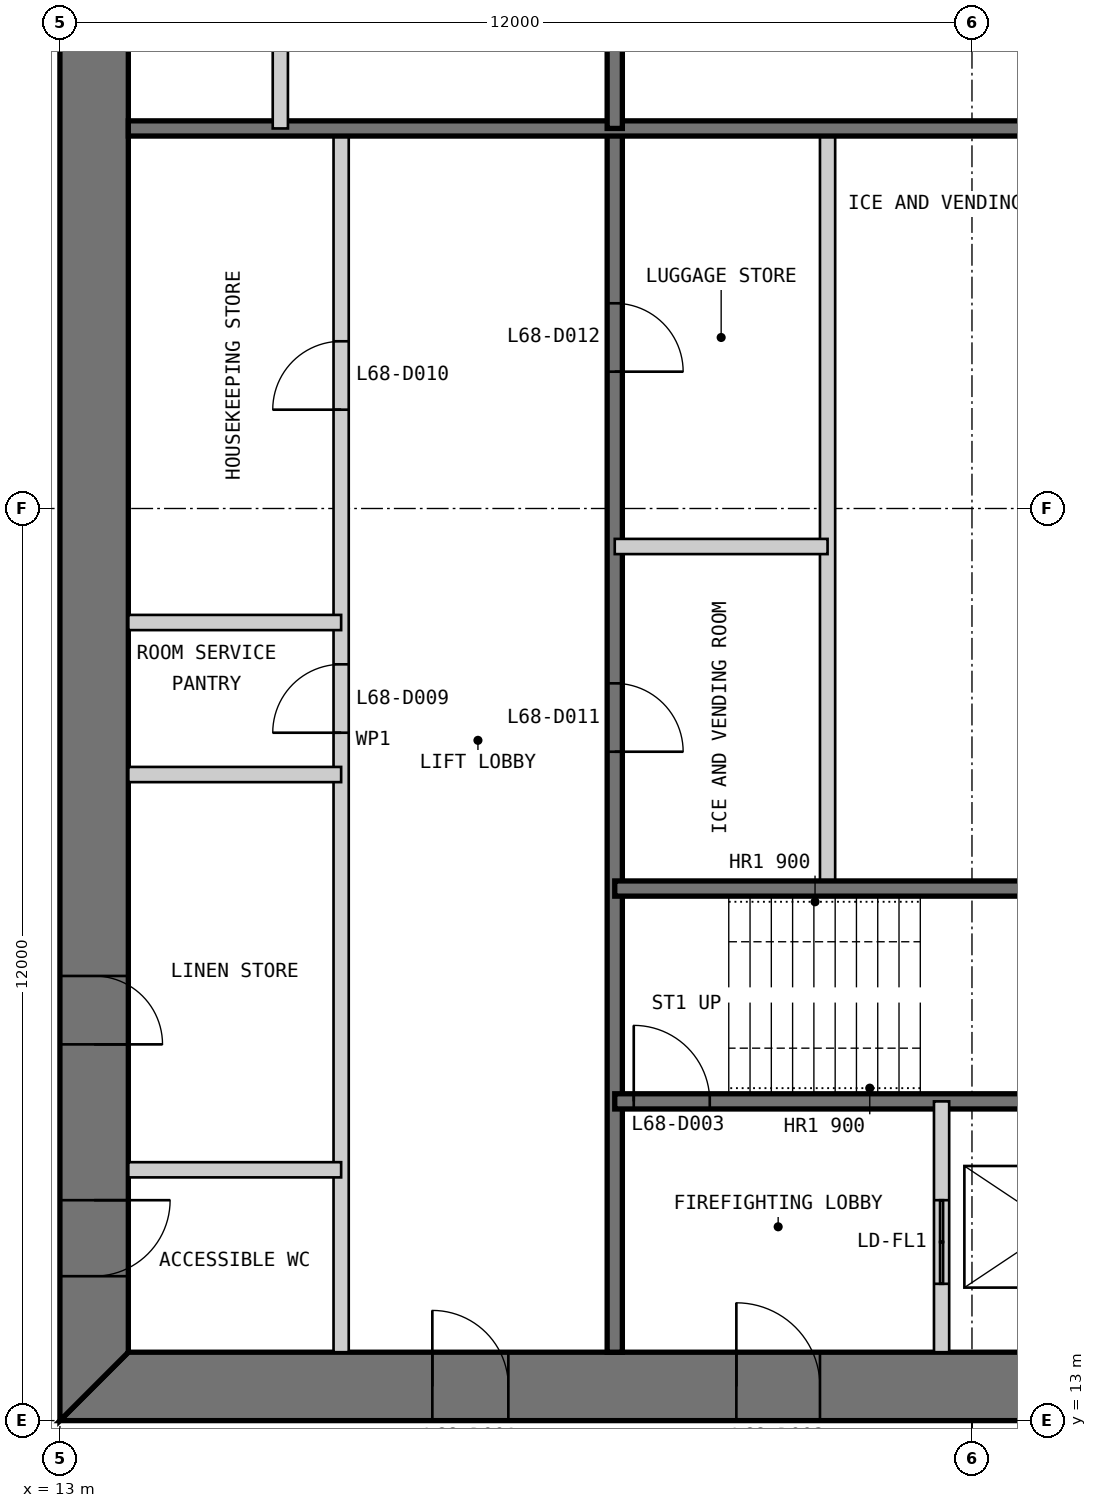
"""IFC4 building model, lengths in metres.
Left out: names, types, materials, properties, quantities, classifications, styles, units other than length and angle.
Written with IfcOpenShell. Run it as: python <this file> out.ifc"""

import sys

from ifc_helpers import new_model, si_unit, direction, frame, frame_2d, origin, place, context, subcontext, project, spatial, polyline, rectangle, outline, extrude, element, fill, save


model = new_model("IFC4")
c1 = context("Model", 3, precision=1e-05, world=origin(), true_north=direction((0.0, 1.0)))
c2 = subcontext(c1, "Body", "Model", "MODEL_VIEW")
j1 = project(units=[si_unit("LENGTHUNIT", "METRE"), si_unit("PLANEANGLEUNIT", "RADIAN")], contexts=[c1])
p1 = place(None, origin())
s1 = spatial("IfcSite", under=j1, at=p1, CompositionType="ELEMENT")
p2 = place(p1, origin())
s2 = spatial("IfcBuilding", under=s1, at=p2, CompositionType="ELEMENT")
p3 = place(p2, frame((0.0, 0.0, 283.2)))
s3 = spatial("IfcBuildingStorey", under=s2, at=p3, CompositionType="ELEMENT", Elevation=283.2)
p4 = place(p3, frame((13.0, 13.45, 0.0), z_axis=(0.0, 0.0, 1.0), x_axis=(1.0, 0.0, 0.0)))
e1 = element("IfcWall", 1, at=p4, inside=s3, PredefinedType="SHEAR", context=c2, shape_type="SweptSolid", body=[
    extrude(outline(polyline([(0.0, -0.45), (24.0, -0.45), (23.1, 0.45), (0.9, 0.45), (0.0, -0.45)])), origin(), (0.0, 0.0, 1.0), 3.4),
])
p5 = place(p4, frame((4.9, 0.0, 0.0)))
e2 = element("IfcOpeningElement", 2, at=p5, cuts=e1, PredefinedType="OPENING", context=c2, shape_type="SweptSolid", body=[
    extrude(rectangle(XDim=1.0, YDim=2.2, at=frame_2d((0.5, 1.1))), frame((0.0, 0.46, 0.0), z_axis=(0.0, -1.0, 0.0), x_axis=(1.0, 0.0, 0.0)), (0.0, 0.0, 1.0), 0.92),
])
p6 = place(p4, frame((8.9, 0.0, 0.0)))
e3 = element("IfcOpeningElement", 3, at=p6, cuts=e1, PredefinedType="OPENING", context=c2, shape_type="SweptSolid", body=[
    extrude(rectangle(XDim=1.1, YDim=2.2, at=frame_2d((0.55, 1.1))), frame((0.0, 0.46, 0.0), z_axis=(0.0, -1.0, 0.0), x_axis=(1.0, 0.0, 0.0)), (0.0, 0.0, 1.0), 0.92),
])
p7 = place(p4, frame((15.05, 0.0, 0.0)))
e4 = element("IfcOpeningElement", 4, at=p7, cuts=e1, PredefinedType="OPENING", context=c2, shape_type="SweptSolid", body=[
    extrude(rectangle(XDim=0.9, YDim=2.2, at=frame_2d((0.45, 1.1))), frame((0.0, 0.46, 0.0), z_axis=(0.0, -1.0, 0.0), x_axis=(1.0, 0.0, 0.0)), (0.0, 0.0, 1.0), 0.92),
])
p8 = place(p4, frame((17.9, 0.0, 0.0)))
e5 = element("IfcOpeningElement", 5, at=p8, cuts=e1, PredefinedType="OPENING", context=c2, shape_type="SweptSolid", body=[
    extrude(rectangle(XDim=1.0, YDim=2.2, at=frame_2d((0.5, 1.1))), frame((0.0, 0.46, 0.0), z_axis=(0.0, -1.0, 0.0), x_axis=(1.0, 0.0, 0.0)), (0.0, 0.0, 1.0), 0.92),
])
p9 = place(p4, frame((21.4, 0.0, 0.0)))
e6 = element("IfcOpeningElement", 6, at=p9, cuts=e1, PredefinedType="OPENING", context=c2, shape_type="SweptSolid", body=[
    extrude(rectangle(XDim=1.0, YDim=2.2, at=frame_2d((0.5, 1.1))), frame((0.0, 0.46, 0.0), z_axis=(0.0, -1.0, 0.0), x_axis=(1.0, 0.0, 0.0)), (0.0, 0.0, 1.0), 0.92),
])
p10 = place(p3, frame((13.45, 36.1, 0.0), z_axis=(0.0, 0.0, 1.0), x_axis=(0.0, -1.0, 0.0)))
e7 = element("IfcWall", 7, at=p10, inside=s3, PredefinedType="SHEAR", context=c2, shape_type="SweptSolid", body=[
    extrude(outline(polyline([(-0.9, -0.45), (23.1, -0.45), (22.2, 0.45), (0.0, 0.45), (-0.9, -0.45)])), origin(), (0.0, 0.0, 1.0), 3.4),
])
p11 = place(p10, frame((20.2, 0.0, 0.0)))
e8 = element("IfcOpeningElement", 8, at=p11, cuts=e7, PredefinedType="OPENING", context=c2, shape_type="SweptSolid", body=[
    extrude(rectangle(XDim=1.0, YDim=2.2, at=frame_2d((0.5, 1.1))), frame((0.0, 0.46, 0.0), z_axis=(0.0, -1.0, 0.0), x_axis=(1.0, 0.0, 0.0)), (0.0, 0.0, 1.0), 0.92),
])
p12 = place(p10, frame((17.25, 0.0, 0.0)))
e9 = element("IfcOpeningElement", 9, at=p12, cuts=e7, PredefinedType="OPENING", context=c2, shape_type="SweptSolid", body=[
    extrude(rectangle(XDim=0.9, YDim=2.2, at=frame_2d((0.45, 1.1))), frame((0.0, 0.46, 0.0), z_axis=(0.0, -1.0, 0.0), x_axis=(1.0, 0.0, 0.0)), (0.0, 0.0, 1.0), 0.92),
])
p13 = place(p3, frame((16.7, 13.9, 0.0), z_axis=(0.0, 0.0, 1.0), x_axis=(0.0, 1.0, 0.0)))
e10 = element("IfcWall", 10, at=p13, inside=s3, PredefinedType="PARTITIONING", context=c2, shape_type="SweptSolid", body=[
    extrude(rectangle(XDim=16.1, YDim=0.2, at=frame_2d((8.05, 0.0))), origin(), (0.0, 0.0, 1.0), 3.2),
])
p14 = place(p13, frame((8.15, 0.0, 0.0)))
e11 = element("IfcOpeningElement", 11, at=p14, cuts=e10, PredefinedType="OPENING", context=c2, shape_type="SweptSolid", body=[
    extrude(rectangle(XDim=0.9, YDim=2.2, at=frame_2d((0.45, 1.1))), frame((0.0, 0.11, 0.0), z_axis=(0.0, -1.0, 0.0), x_axis=(1.0, 0.0, 0.0)), (0.0, 0.0, 1.0), 0.22),
])
p15 = place(p13, frame((12.4, 0.0, 0.0)))
e12 = element("IfcOpeningElement", 12, at=p15, cuts=e10, PredefinedType="OPENING", context=c2, shape_type="SweptSolid", body=[
    extrude(rectangle(XDim=0.9, YDim=2.2, at=frame_2d((0.45, 1.1))), frame((0.0, 0.11, 0.0), z_axis=(0.0, -1.0, 0.0), x_axis=(1.0, 0.0, 0.0)), (0.0, 0.0, 1.0), 0.22),
])
p16 = place(p3, frame((20.3, 13.9, 0.0), z_axis=(0.0, 0.0, 1.0), x_axis=(0.0, 1.0, 0.0)))
e13 = element("IfcWall", 13, at=p16, inside=s3, PredefinedType="SOLIDWALL", context=c2, shape_type="SweptSolid", body=[
    extrude(rectangle(XDim=16.1, YDim=0.2, at=frame_2d((8.05, 0.0))), origin(), (0.0, 0.0, 1.0), 3.2),
])
p17 = place(p16, frame((7.9, 0.0, 0.0)))
e14 = element("IfcOpeningElement", 14, at=p17, cuts=e13, PredefinedType="OPENING", context=c2, shape_type="SweptSolid", body=[
    extrude(rectangle(XDim=0.9, YDim=2.2, at=frame_2d((0.45, 1.1))), frame((0.0, 0.11, 0.0), z_axis=(0.0, -1.0, 0.0), x_axis=(1.0, 0.0, 0.0)), (0.0, 0.0, 1.0), 0.22),
])
p18 = place(p16, frame((12.9, 0.0, 0.0)))
e15 = element("IfcOpeningElement", 15, at=p18, cuts=e13, PredefinedType="OPENING", context=c2, shape_type="SweptSolid", body=[
    extrude(rectangle(XDim=0.9, YDim=2.2, at=frame_2d((0.45, 1.1))), frame((0.0, 0.11, 0.0), z_axis=(0.0, -1.0, 0.0), x_axis=(1.0, 0.0, 0.0)), (0.0, 0.0, 1.0), 0.22),
])
p19 = place(p3, frame((23.1, 20.0, 0.0), z_axis=(0.0, 0.0, 1.0), x_axis=(0.0, 1.0, 0.0)))
e16 = element("IfcWall", 16, at=p19, inside=s3, PredefinedType="PARTITIONING", context=c2, shape_type="SweptSolid", body=[
    extrude(rectangle(XDim=10.0, YDim=0.2, at=frame_2d((5.0, 0.0))), origin(), (0.0, 0.0, 1.0), 3.2),
])
p20 = place(p3, frame((20.3, 17.2, 0.0), z_axis=(0.0, 0.0, 1.0), x_axis=(1.0, 0.0, 0.0)))
e17 = element("IfcWall", 17, at=p20, inside=s3, PredefinedType="SOLIDWALL", context=c2, shape_type="SweptSolid", body=[
    extrude(rectangle(XDim=9.4, YDim=0.2, at=frame_2d((4.7, 0.0))), origin(), (0.0, 0.0, 1.0), 3.2),
])
p21 = place(p20, frame((0.25, 0.0, 0.0)))
e18 = element("IfcOpeningElement", 18, at=p21, cuts=e17, PredefinedType="OPENING", context=c2, shape_type="SweptSolid", body=[
    extrude(rectangle(XDim=1.0, YDim=2.2, at=frame_2d((0.5, 1.1))), frame((0.0, 0.11, 0.0), z_axis=(0.0, -1.0, 0.0), x_axis=(1.0, 0.0, 0.0)), (0.0, 0.0, 1.0), 0.22),
])
p22 = place(p3, frame((20.3, 20.0, 0.0), z_axis=(0.0, 0.0, 1.0), x_axis=(1.0, 0.0, 0.0)))
e19 = element("IfcWall", 19, at=p22, inside=s3, PredefinedType="SOLIDWALL", context=c2, shape_type="SweptSolid", body=[
    extrude(rectangle(XDim=15.8, YDim=0.2, at=frame_2d((7.9, 0.0))), origin(), (0.0, 0.0, 1.0), 3.2),
])
p23 = place(p3, frame((24.6, 13.9, 0.0), z_axis=(0.0, 0.0, 1.0), x_axis=(0.0, 1.0, 0.0)))
e20 = element("IfcWall", 20, at=p23, inside=s3, PredefinedType="PARTITIONING", context=c2, shape_type="SweptSolid", body=[
    extrude(rectangle(XDim=3.3, YDim=0.2, at=frame_2d((1.65, 0.0))), origin(), (0.0, 0.0, 1.0), 3.2),
])
p24 = place(p23, frame((0.9, 0.0, 0.0)))
e21 = element("IfcOpeningElement", 21, at=p24, cuts=e20, PredefinedType="OPENING", context=c2, shape_type="SweptSolid", body=[
    extrude(rectangle(XDim=1.1, YDim=2.2, at=frame_2d((0.55, 1.1))), frame((0.0, 0.11, 0.0), z_axis=(0.0, -1.0, 0.0), x_axis=(1.0, 0.0, 0.0)), (0.0, 0.0, 1.0), 0.22),
])
for number, where, z_axis, x_axis in (
    (22, (13.9, 16.3, 0.0), (0.0, 0.0, 1.0), (1.0, 0.0, 0.0)),
    (23, (13.9, 21.5, 0.0), (0.0, 0.0, 1.0), (1.0, 0.0, 0.0)),
    (24, (13.9, 23.5, 0.0), (0.0, 0.0, 1.0), (1.0, 0.0, 0.0)),
    (25, (20.3, 24.5, 0.0), (0.0, 0.0, 1.0), (1.0, 0.0, 0.0)),
):
    element("IfcWall", number, at=place(p3, frame(where, z_axis=z_axis, x_axis=x_axis)), inside=s3, PredefinedType="PARTITIONING", context=c2, shape_type="SweptSolid", body=[
        extrude(rectangle(XDim=2.8, YDim=0.2, at=frame_2d((1.4, 0.0))), origin(), (0.0, 0.0, 1.0), 3.2),
    ])
p25 = place(p3, frame((29.7, 30.0, 0.0), z_axis=(0.0, 0.0, 1.0), x_axis=(-1.0, 0.0, 0.0)))
e26 = element("IfcWall", 26, at=p25, inside=s3, PredefinedType="SOLIDWALL", context=c2, shape_type="SweptSolid", body=[
    extrude(rectangle(XDim=15.8, YDim=0.2, at=frame_2d((7.9, 0.0))), origin(), (0.0, 0.0, 1.0), 3.2),
])
p26 = place(p3, frame((20.3, 36.1, 0.0), z_axis=(0.0, 0.0, 1.0), x_axis=(0.0, -1.0, 0.0)))
e27 = element("IfcWall", 27, at=p26, inside=s3, PredefinedType="SOLIDWALL", context=c2, shape_type="SweptSolid", body=[
    extrude(rectangle(XDim=6.1, YDim=0.2, at=frame_2d((3.05, 0.0))), origin(), (0.0, 0.0, 1.0), 3.2),
])
p27 = place(p3, frame((15.9, 36.1, 0.0), z_axis=(0.0, 0.0, 1.0), x_axis=(0.0, -1.0, 0.0)))
e28 = element("IfcWall", 28, at=p27, inside=s3, PredefinedType="PARTITIONING", context=c2, shape_type="SweptSolid", body=[
    extrude(rectangle(XDim=6.1, YDim=0.2, at=frame_2d((3.05, 0.0))), origin(), (0.0, 0.0, 1.0), 3.2),
])
p28 = place(p5, origin())
e29 = element("IfcDoor", 29, at=p28, inside=s3, OperationType="SINGLE_SWING_LEFT", PredefinedType="DOOR", context=c2, shape_type="SweptSolid", body=[
    extrude(rectangle(XDim=1.0, YDim=2.2, at=frame_2d((0.5, 1.1))), frame((0.0, 0.025, 0.0), z_axis=(0.0, -1.0, 0.0), x_axis=(1.0, 0.0, 0.0)), (0.0, 0.0, 1.0), 0.05),
    extrude(outline(polyline([(0.0, 0.0), (0.04, 0.0), (0.04, 2.16), (0.96, 2.16), (0.96, 0.0), (1.0, 0.0), (1.0, 2.2), (0.0, 2.2), (0.0, 0.0)])), frame((0.0, 0.3, 0.0), z_axis=(0.0, -1.0, 0.0), x_axis=(1.0, 0.0, 0.0)), (0.0, 0.0, 1.0), 0.6),
])
fill(e2, e29)
p29 = place(p6, origin())
e30 = element("IfcDoor", 30, at=p29, inside=s3, OperationType="SINGLE_SWING_LEFT", PredefinedType="DOOR", context=c2, shape_type="SweptSolid", body=[
    extrude(rectangle(XDim=1.1, YDim=2.2, at=frame_2d((0.55, 1.1))), frame((0.0, 0.025, 0.0), z_axis=(0.0, -1.0, 0.0), x_axis=(1.0, 0.0, 0.0)), (0.0, 0.0, 1.0), 0.05),
    extrude(outline(polyline([(0.0, 0.0), (0.04, 0.0), (0.04, 2.16), (1.06, 2.16), (1.06, 0.0), (1.1, 0.0), (1.1, 2.2), (0.0, 2.2), (0.0, 0.0)])), frame((0.0, 0.3, 0.0), z_axis=(0.0, -1.0, 0.0), x_axis=(1.0, 0.0, 0.0)), (0.0, 0.0, 1.0), 0.6),
])
fill(e3, e30)
p30 = place(p21, origin())
e31 = element("IfcDoor", 31, at=p30, inside=s3, OperationType="SINGLE_SWING_LEFT", PredefinedType="DOOR", context=c2, shape_type="SweptSolid", body=[
    extrude(rectangle(XDim=1.0, YDim=2.2, at=frame_2d((0.5, 1.1))), frame((0.0, 0.025, 0.0), z_axis=(0.0, -1.0, 0.0), x_axis=(1.0, 0.0, 0.0)), (0.0, 0.0, 1.0), 0.05),
])
fill(e18, e31)
p31 = place(p11, origin())
e32 = element("IfcDoor", 32, at=p31, inside=s3, OperationType="SINGLE_SWING_LEFT", PredefinedType="DOOR", context=c2, shape_type="SweptSolid", body=[
    extrude(rectangle(XDim=1.0, YDim=2.2, at=frame_2d((0.5, 1.1))), frame((0.0, 0.025, 0.0), z_axis=(0.0, -1.0, 0.0), x_axis=(1.0, 0.0, 0.0)), (0.0, 0.0, 1.0), 0.05),
    extrude(outline(polyline([(0.0, 0.0), (0.04, 0.0), (0.04, 2.16), (0.96, 2.16), (0.96, 0.0), (1.0, 0.0), (1.0, 2.2), (0.0, 2.2), (0.0, 0.0)])), frame((0.0, 0.3, 0.0), z_axis=(0.0, -1.0, 0.0), x_axis=(1.0, 0.0, 0.0)), (0.0, 0.0, 1.0), 0.6),
])
fill(e8, e32)
p32 = place(p12, origin())
e33 = element("IfcDoor", 33, at=p32, inside=s3, OperationType="SINGLE_SWING_RIGHT", PredefinedType="DOOR", context=c2, shape_type="SweptSolid", body=[
    extrude(rectangle(XDim=0.9, YDim=2.2, at=frame_2d((0.45, 1.1))), frame((0.0, 0.025, 0.0), z_axis=(0.0, -1.0, 0.0), x_axis=(1.0, 0.0, 0.0)), (0.0, 0.0, 1.0), 0.05),
    extrude(outline(polyline([(0.0, 0.0), (0.04, 0.0), (0.04, 2.16), (0.86, 2.16), (0.86, 0.0), (0.9, 0.0), (0.9, 2.2), (0.0, 2.2), (0.0, 0.0)])), frame((0.0, 0.3, 0.0), z_axis=(0.0, -1.0, 0.0), x_axis=(1.0, 0.0, 0.0)), (0.0, 0.0, 1.0), 0.6),
])
fill(e9, e33)
p33 = place(p14, origin())
e34 = element("IfcDoor", 34, at=p33, inside=s3, OperationType="SINGLE_SWING_LEFT", PredefinedType="DOOR", context=c2, shape_type="SweptSolid", body=[
    extrude(rectangle(XDim=0.9, YDim=2.2, at=frame_2d((0.45, 1.1))), frame((0.0, 0.025, 0.0), z_axis=(0.0, -1.0, 0.0), x_axis=(1.0, 0.0, 0.0)), (0.0, 0.0, 1.0), 0.05),
])
fill(e11, e34)
p34 = place(p15, origin())
e35 = element("IfcDoor", 35, at=p34, inside=s3, OperationType="SINGLE_SWING_LEFT", PredefinedType="DOOR", context=c2, shape_type="SweptSolid", body=[
    extrude(rectangle(XDim=0.9, YDim=2.2, at=frame_2d((0.45, 1.1))), frame((0.0, 0.025, 0.0), z_axis=(0.0, -1.0, 0.0), x_axis=(1.0, 0.0, 0.0)), (0.0, 0.0, 1.0), 0.05),
])
fill(e12, e35)
p35 = place(p17, frame((0.9, 0.0, 0.0), z_axis=(0.0, 0.0, 1.0), x_axis=(-1.0, 0.0, 0.0)))
e36 = element("IfcDoor", 36, at=p35, inside=s3, OperationType="SINGLE_SWING_RIGHT", PredefinedType="DOOR", context=c2, shape_type="SweptSolid", body=[
    extrude(rectangle(XDim=0.9, YDim=2.2, at=frame_2d((0.45, 1.1))), frame((0.0, 0.025, 0.0), z_axis=(0.0, -1.0, 0.0), x_axis=(1.0, 0.0, 0.0)), (0.0, 0.0, 1.0), 0.05),
])
fill(e14, e36)
p36 = place(p18, frame((0.9, 0.0, 0.0), z_axis=(0.0, 0.0, 1.0), x_axis=(-1.0, 0.0, 0.0)))
e37 = element("IfcDoor", 37, at=p36, inside=s3, OperationType="SINGLE_SWING_RIGHT", PredefinedType="DOOR", context=c2, shape_type="SweptSolid", body=[
    extrude(rectangle(XDim=0.9, YDim=2.2, at=frame_2d((0.45, 1.1))), frame((0.0, 0.025, 0.0), z_axis=(0.0, -1.0, 0.0), x_axis=(1.0, 0.0, 0.0)), (0.0, 0.0, 1.0), 0.05),
])
fill(e15, e37)
p37 = place(p24, origin())
e38 = element("IfcDoor", 38, at=p37, inside=s3, OperationType="DOUBLE_DOOR_SLIDING", PredefinedType="DOOR", context=c2, shape_type="SweptSolid", body=[
    extrude(rectangle(XDim=1.1, YDim=2.2, at=frame_2d((0.55, 1.1))), frame((0.0, 0.025, 0.0), z_axis=(0.0, -1.0, 0.0), x_axis=(1.0, 0.0, 0.0)), (0.0, 0.0, 1.0), 0.05),
])
fill(e21, e38)
save(model, sys.argv[1])
